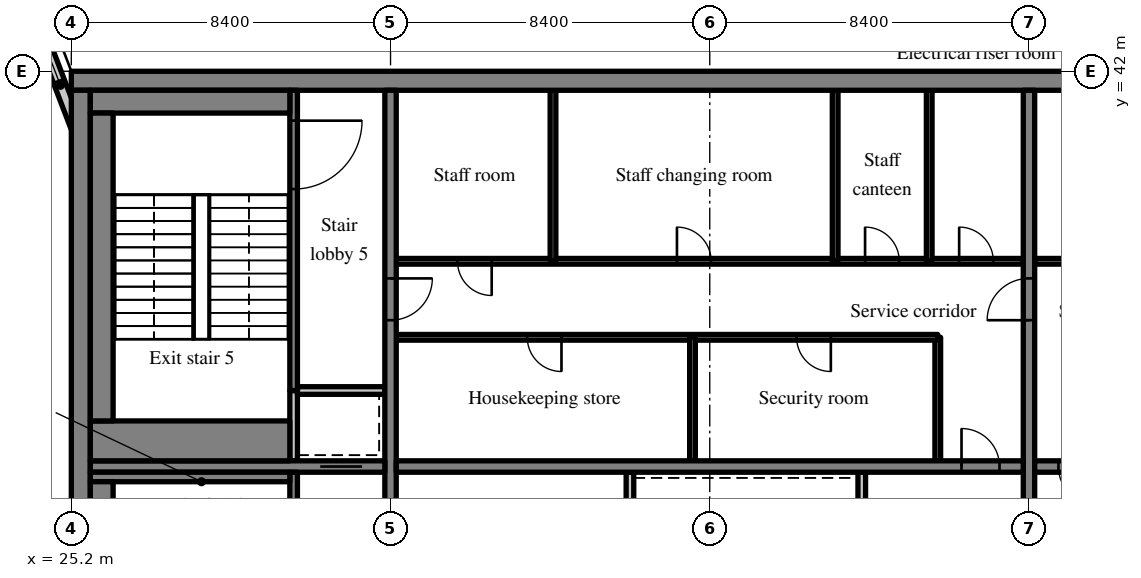
"""IFC4 building model, lengths in metres.
Left out: names, types, materials, properties, quantities, classifications, styles, units other than length and angle.
Written with IfcOpenShell. Run it as: python <this file> out.ifc"""

import sys

from ifc_helpers import new_model, si_unit, direction, frame, frame_2d, origin, place, context, subcontext, project, spatial, rectangle, extrude, source, transform, mapped, element, fill, save


model = new_model("IFC4")
c1 = context("Model", 3, precision=1e-05, world=origin(), true_north=direction((0.0, 1.0)))
c2 = subcontext(c1, "Body", "Model", "MODEL_VIEW")
j1 = project(units=[si_unit("LENGTHUNIT", "METRE"), si_unit("PLANEANGLEUNIT", "RADIAN")], contexts=[c1])
p1 = place(None, origin())
s1 = spatial("IfcSite", under=j1, at=p1, CompositionType="ELEMENT")
p2 = place(p1, origin())
s2 = spatial("IfcBuilding", under=s1, at=p2, CompositionType="ELEMENT")
p3 = place(p2, frame((0.0, 0.0, 309.7)))
s3 = spatial("IfcBuildingStorey", under=s2, at=p3, CompositionType="ELEMENT", Elevation=309.7)
m1 = source(origin(), c2, "Body", "SweptSolid", [
    extrude(rectangle(XDim=50.4, YDim=0.5, at=frame_2d((25.2, 0.0))), origin(), (0.0, 0.0, 1.0), 3.72),
])
p4 = place(p3, frame((25.2, 41.75, 0.0), z_axis=(0.0, 0.0, 1.0), x_axis=(1.0, 0.0, 0.0)))
e1 = element("IfcWall", 1, at=p4, inside=s3, PredefinedType="SHEAR", context=c2, shape_type="MappedRepresentation", body=[
    mapped(m1, transform((0.0, 0.0, 0.0), scale=1.0)),
])
m2 = source(origin(), c2, "Body", "SweptSolid", [
    extrude(rectangle(XDim=19.0, YDim=0.5, at=frame_2d((9.5, 0.0))), origin(), (0.0, 0.0, 1.0), 3.72),
])
p5 = place(p3, frame((25.45, 22.5, 0.0), z_axis=(0.0, 0.0, 1.0), x_axis=(0.0, 1.0, 0.0)))
e2 = element("IfcWall", 2, at=p5, inside=s3, PredefinedType="SHEAR", context=c2, shape_type="MappedRepresentation", body=[
    mapped(m2, transform((0.0, 0.0, 0.0), scale=1.0)),
])
m3 = source(origin(), c2, "Body", "SweptSolid", [
    extrude(rectangle(XDim=19.0, YDim=0.3, at=frame_2d((9.5, 0.0))), origin(), (0.0, 0.0, 1.0), 3.72),
])
p6 = place(p3, frame((33.6, 22.5, 0.0), z_axis=(0.0, 0.0, 1.0), x_axis=(0.0, 1.0, 0.0)))
e3 = element("IfcWall", 3, at=p6, inside=s3, PredefinedType="SHEAR", context=c2, shape_type="MappedRepresentation", body=[
    mapped(m3, transform((0.0, 0.0, 0.0), scale=1.0)),
])
m4 = source(origin(), c2, "Body", "SweptSolid", [
    extrude(rectangle(XDim=1.1, YDim=2.1, at=frame_2d((0.55, 1.05))), frame((0.0, 0.16, 0.0), z_axis=(0.0, -1.0, 0.0), x_axis=(1.0, 0.0, 0.0)), (0.0, 0.0, 1.0), 0.32),
])
p7 = place(p6, frame((12.95, 0.0, 0.0)))
e4 = element("IfcOpeningElement", 4, at=p7, cuts=e3, PredefinedType="OPENING", context=c2, shape_type="MappedRepresentation", body=[
    mapped(m4, transform((0.0, 0.0, 0.0), scale=1.0)),
])
p8 = place(p3, frame((50.4, 22.5, 0.0), z_axis=(0.0, 0.0, 1.0), x_axis=(0.0, 1.0, 0.0)))
e5 = element("IfcWall", 5, at=p8, inside=s3, PredefinedType="SHEAR", context=c2, shape_type="MappedRepresentation", body=[
    mapped(m3, transform((0.0, 0.0, 0.0), scale=1.0)),
])
p9 = place(p8, frame((12.95, 0.0, 0.0)))
e6 = element("IfcOpeningElement", 6, at=p9, cuts=e5, PredefinedType="OPENING", context=c2, shape_type="MappedRepresentation", body=[
    mapped(m4, transform((0.0, 0.0, 0.0), scale=1.0)),
])
m5 = source(origin(), c2, "Body", "SweptSolid", [
    extrude(rectangle(XDim=7.75, YDim=0.3, at=frame_2d((3.875, 0.0))), origin(), (0.0, 0.0, 1.0), 3.72),
])
p10 = place(p3, frame((25.7, 31.6, 0.0), z_axis=(0.0, 0.0, 1.0), x_axis=(1.0, 0.0, 0.0)))
e7 = element("IfcWall", 7, at=p10, inside=s3, PredefinedType="SHEAR", context=c2, shape_type="MappedRepresentation", body=[
    mapped(m5, transform((0.0, 0.0, 0.0), scale=1.0)),
])
p11 = place(p10, frame((6.05, 0.0, 0.0)))
e8 = element("IfcOpeningElement", 8, at=p11, cuts=e7, PredefinedType="OPENING", context=c2, shape_type="MappedRepresentation", body=[
    mapped(m4, transform((0.0, 0.0, 0.0), scale=1.0)),
])
m6 = source(origin(), c2, "Body", "SweptSolid", [
    extrude(rectangle(XDim=16.5, YDim=0.3, at=frame_2d((8.25, 0.0))), origin(), (0.0, 0.0, 1.0), 3.72),
])
p12 = place(p3, frame((33.75, 31.6, 0.0), z_axis=(0.0, 0.0, 1.0), x_axis=(1.0, 0.0, 0.0)))
e9 = element("IfcWall", 9, at=p12, inside=s3, PredefinedType="SHEAR", context=c2, shape_type="MappedRepresentation", body=[
    mapped(m6, transform((0.0, 0.0, 0.0), scale=1.0)),
])
m7 = source(origin(), c2, "Body", "SweptSolid", [
    extrude(rectangle(XDim=1.0, YDim=2.1, at=frame_2d((0.5, 1.05))), frame((0.0, 0.16, 0.0), z_axis=(0.0, -1.0, 0.0), x_axis=(1.0, 0.0, 0.0)), (0.0, 0.0, 1.0), 0.32),
])
p13 = place(p12, frame((14.875, 0.0, 0.0)))
e10 = element("IfcOpeningElement", 10, at=p13, cuts=e9, PredefinedType="OPENING", context=c2, shape_type="MappedRepresentation", body=[
    mapped(m7, transform((0.0, 0.0, 0.0), scale=1.0)),
])
p14 = place(p3, frame((50.55, 31.6, 0.0), z_axis=(0.0, 0.0, 1.0), x_axis=(1.0, 0.0, 0.0)))
e11 = element("IfcWall", 11, at=p14, inside=s3, PredefinedType="SHEAR", context=c2, shape_type="MappedRepresentation", body=[
    mapped(m6, transform((0.0, 0.0, 0.0), scale=1.0)),
])
p15 = place(p14, frame((0.625, 0.0, 0.0)))
e12 = element("IfcOpeningElement", 12, at=p15, cuts=e11, PredefinedType="OPENING", context=c2, shape_type="MappedRepresentation", body=[
    mapped(m7, transform((0.0, 0.0, 0.0), scale=1.0)),
])
m8 = source(origin(), c2, "Body", "SweptSolid", [
    extrude(rectangle(XDim=3.559, YDim=0.3, at=frame_2d((1.78, 0.0))), origin(), (0.0, 0.0, 1.0), 3.72),
])
p16 = place(p3, frame((25.55, 39.969, 0.0), z_axis=(0.0, 0.0, 1.0), x_axis=(-0.35779745313, 0.933799219604, 0.0)))
e13 = element("IfcWall", 13, at=p16, inside=s3, PredefinedType="SOLIDWALL", context=c2, shape_type="MappedRepresentation", body=[
    mapped(m8, transform((0.0, 0.0, 0.0), scale=1.0)),
])
m9 = source(origin(), c2, "Body", "SweptSolid", [
    extrude(rectangle(XDim=1.5, YDim=2.0, at=frame_2d((0.75, 1.0))), frame((0.0, 0.16, 0.0), z_axis=(0.0, -1.0, 0.0), x_axis=(1.0, 0.0, 0.0)), (0.0, 0.0, 1.0), 0.32),
])
p17 = place(p16, frame((1.903, 0.0, 0.9)))
e14 = element("IfcOpeningElement", 14, at=p17, cuts=e13, PredefinedType="OPENING", context=c2, shape_type="MappedRepresentation", body=[
    mapped(m9, transform((0.0, 0.0, 0.0), scale=1.0)),
])
m10 = source(origin(), c2, "Body", "SweptSolid", [
    extrude(rectangle(XDim=8.95, YDim=0.2, at=frame_2d((4.475, 0.0))), origin(), (0.0, 0.0, 1.0), 3.72),
])
p18 = place(p3, frame((39.9, 22.5, 0.0), z_axis=(0.0, 0.0, 1.0), x_axis=(0.0, 1.0, 0.0)))
e15 = element("IfcWall", 15, at=p18, inside=s3, PredefinedType="PARTITIONING", context=c2, shape_type="MappedRepresentation", body=[
    mapped(m10, transform((0.0, 0.0, 0.0), scale=1.0)),
])
m11 = source(origin(), c2, "Body", "SweptSolid", [
    extrude(rectangle(XDim=0.9, YDim=2.1, at=frame_2d((0.45, 1.05))), frame((0.0, 0.11, 0.0), z_axis=(0.0, -1.0, 0.0), x_axis=(1.0, 0.0, 0.0)), (0.0, 0.0, 1.0), 0.22),
])
p19 = place(p18, frame((5.05, 0.0, 0.0)))
e16 = element("IfcOpeningElement", 16, at=p19, cuts=e15, PredefinedType="OPENING", context=c2, shape_type="MappedRepresentation", body=[
    mapped(m11, transform((0.0, 0.0, 0.0), scale=1.0)),
])
m12 = source(origin(), c2, "Body", "SweptSolid", [
    extrude(rectangle(XDim=2.65, YDim=0.2, at=frame_2d((1.325, 0.0))), origin(), (0.0, 0.0, 1.0), 3.72),
])
p20 = place(p3, frame((46.0, 28.8, 0.0), z_axis=(0.0, 0.0, 1.0), x_axis=(0.0, 1.0, 0.0)))
e17 = element("IfcWall", 17, at=p20, inside=s3, PredefinedType="SOLIDWALL", context=c2, shape_type="MappedRepresentation", body=[
    mapped(m12, transform((0.0, 0.0, 0.0), scale=1.0)),
])
m13 = source(origin(), c2, "Body", "SweptSolid", [
    extrude(rectangle(XDim=3.25, YDim=0.15, at=frame_2d((1.625, 0.0))), origin(), (0.0, 0.0, 1.0), 3.72),
])
p21 = place(p3, frame((48.0, 31.75, 0.0), z_axis=(0.0, 0.0, 1.0), x_axis=(0.0, 1.0, 0.0)))
e18 = element("IfcWall", 18, at=p21, inside=s3, PredefinedType="PARTITIONING", context=c2, shape_type="MappedRepresentation", body=[
    mapped(m13, transform((0.0, 0.0, 0.0), scale=1.0)),
])
m14 = source(origin(), c2, "Body", "SweptSolid", [
    extrude(rectangle(XDim=14.25, YDim=0.15, at=frame_2d((7.125, 0.0))), origin(), (0.0, 0.0, 1.0), 3.72),
])
p22 = place(p3, frame((33.75, 35.0, 0.0), z_axis=(0.0, 0.0, 1.0), x_axis=(1.0, 0.0, 0.0)))
e19 = element("IfcWall", 19, at=p22, inside=s3, PredefinedType="PARTITIONING", context=c2, shape_type="MappedRepresentation", body=[
    mapped(m14, transform((0.0, 0.0, 0.0), scale=1.0)),
])
m15 = source(origin(), c2, "Body", "SweptSolid", [
    extrude(rectangle(XDim=0.9, YDim=2.1, at=frame_2d((0.45, 1.05))), frame((0.0, 0.085, 0.0), z_axis=(0.0, -1.0, 0.0), x_axis=(1.0, 0.0, 0.0)), (0.0, 0.0, 1.0), 0.17),
])
p23 = place(p22, frame((3.448, 0.0, 0.0)))
e20 = element("IfcOpeningElement", 20, at=p23, cuts=e19, PredefinedType="OPENING", context=c2, shape_type="MappedRepresentation", body=[
    mapped(m15, transform((0.0, 0.0, 0.0), scale=1.0)),
])
p24 = place(p22, frame((10.536, 0.0, 0.0)))
e21 = element("IfcOpeningElement", 21, at=p24, cuts=e19, PredefinedType="OPENING", context=c2, shape_type="MappedRepresentation", body=[
    mapped(m15, transform((0.0, 0.0, 0.0), scale=1.0)),
])
m16 = source(origin(), c2, "Body", "SweptSolid", [
    extrude(rectangle(XDim=16.5, YDim=0.15, at=frame_2d((8.25, 0.0))), origin(), (0.0, 0.0, 1.0), 3.72),
])
p25 = place(p3, frame((33.75, 37.0, 0.0), z_axis=(0.0, 0.0, 1.0), x_axis=(1.0, 0.0, 0.0)))
e22 = element("IfcWall", 22, at=p25, inside=s3, PredefinedType="PARTITIONING", context=c2, shape_type="MappedRepresentation", body=[
    mapped(m16, transform((0.0, 0.0, 0.0), scale=1.0)),
])
p26 = place(p25, frame((1.612, 0.0, 0.0)))
e23 = element("IfcOpeningElement", 23, at=p26, cuts=e22, PredefinedType="OPENING", context=c2, shape_type="MappedRepresentation", body=[
    mapped(m15, transform((0.0, 0.0, 0.0), scale=1.0)),
])
p27 = place(p25, frame((7.387, 0.0, 0.0)))
e24 = element("IfcOpeningElement", 24, at=p27, cuts=e22, PredefinedType="OPENING", context=c2, shape_type="MappedRepresentation", body=[
    mapped(m15, transform((0.0, 0.0, 0.0), scale=1.0)),
])
p28 = place(p25, frame((12.337, 0.0, 0.0)))
e25 = element("IfcOpeningElement", 25, at=p28, cuts=e22, PredefinedType="OPENING", context=c2, shape_type="MappedRepresentation", body=[
    mapped(m15, transform((0.0, 0.0, 0.0), scale=1.0)),
])
p29 = place(p25, frame((14.813, 0.0, 0.0)))
e26 = element("IfcOpeningElement", 26, at=p29, cuts=e22, PredefinedType="OPENING", context=c2, shape_type="MappedRepresentation", body=[
    mapped(m15, transform((0.0, 0.0, 0.0), scale=1.0)),
])
p30 = place(p3, frame((41.546, 31.75, 0.0), z_axis=(0.0, 0.0, 1.0), x_axis=(0.0, 1.0, 0.0)))
e27 = element("IfcWall", 27, at=p30, inside=s3, PredefinedType="PARTITIONING", context=c2, shape_type="MappedRepresentation", body=[
    mapped(m13, transform((0.0, 0.0, 0.0), scale=1.0)),
])
m17 = source(origin(), c2, "Body", "SweptSolid", [
    extrude(rectangle(XDim=4.5, YDim=0.15, at=frame_2d((2.25, 0.0))), origin(), (0.0, 0.0, 1.0), 3.72),
])
for number, where, z_axis, x_axis in (
    (28, (37.875, 37.0, 0.0), (0.0, 0.0, 1.0), (0.0, 1.0, 0.0)),
    (29, (45.3, 37.0, 0.0), (0.0, 0.0, 1.0), (0.0, 1.0, 0.0)),
    (30, (47.775, 37.0, 0.0), (0.0, 0.0, 1.0), (0.0, 1.0, 0.0)),
):
    element("IfcWall", number, at=place(p3, frame(where, z_axis=z_axis, x_axis=x_axis)), inside=s3, PredefinedType="PARTITIONING", context=c2, shape_type="MappedRepresentation", body=[
        mapped(m17, transform((0.0, 0.0, 0.0), scale=1.0)),
    ])
p31 = place(p3, frame((67.05, 37.0, 0.0), z_axis=(0.0, 0.0, 1.0), x_axis=(-1.0, 0.0, 0.0)))
e31 = element("IfcWall", 31, at=p31, inside=s3, PredefinedType="PARTITIONING", context=c2, shape_type="MappedRepresentation", body=[
    mapped(m16, transform((0.0, 0.0, 0.0), scale=1.0)),
])
p32 = place(p31, frame((3.263, 0.0, 0.0)))
e32 = element("IfcOpeningElement", 32, at=p32, cuts=e31, PredefinedType="OPENING", context=c2, shape_type="MappedRepresentation", body=[
    mapped(m15, transform((0.0, 0.0, 0.0), scale=1.0)),
])
p33 = place(p31, frame((8.212, 0.0, 0.0)))
e33 = element("IfcOpeningElement", 33, at=p33, cuts=e31, PredefinedType="OPENING", context=c2, shape_type="MappedRepresentation", body=[
    mapped(m15, transform((0.0, 0.0, 0.0), scale=1.0)),
])
p34 = place(p31, frame((11.513, 0.0, 0.0)))
e34 = element("IfcOpeningElement", 34, at=p34, cuts=e31, PredefinedType="OPENING", context=c2, shape_type="MappedRepresentation", body=[
    mapped(m15, transform((0.0, 0.0, 0.0), scale=1.0)),
])
p35 = place(p31, frame((14.813, 0.0, 0.0)))
e35 = element("IfcOpeningElement", 35, at=p35, cuts=e31, PredefinedType="OPENING", context=c2, shape_type="MappedRepresentation", body=[
    mapped(m15, transform((0.0, 0.0, 0.0), scale=1.0)),
])
m18 = source(origin(), c2, "Body", "SweptSolid", [
    extrude(rectangle(XDim=8.95, YDim=0.2, at=frame_2d((4.475, 0.0))), origin(), (0.0, 0.0, 1.0), 3.72),
])
p36 = place(p3, frame((31.05, 22.5, 0.0), z_axis=(0.0, 0.0, 1.0), x_axis=(0.0, 1.0, 0.0)))
e36 = element("IfcWall", 36, at=p36, inside=s3, PredefinedType="SOLIDWALL", context=c2, shape_type="MappedRepresentation", body=[
    mapped(m18, transform((0.0, 0.0, 0.0), scale=1.0)),
])
m19 = source(origin(), c2, "Body", "SweptSolid", [
    extrude(rectangle(XDim=1.2, YDim=2.1, at=frame_2d((0.6, 1.05))), frame((0.0, 0.11, 0.0), z_axis=(0.0, -1.0, 0.0), x_axis=(1.0, 0.0, 0.0)), (0.0, 0.0, 1.0), 0.22),
])
p37 = place(p36, frame((7.0, 0.0, 0.0)))
e37 = element("IfcOpeningElement", 37, at=p37, cuts=e36, PredefinedType="OPENING", context=c2, shape_type="MappedRepresentation", body=[
    mapped(m19, transform((0.0, 0.0, 0.0), scale=1.0)),
])
m20 = source(origin(), c2, "Body", "SweptSolid", [
    extrude(rectangle(XDim=1.85, YDim=0.2, at=frame_2d((0.925, 0.0))), origin(), (0.0, 0.0, 1.0), 3.72),
])
p38 = place(p3, frame((31.05, 31.75, 0.0), z_axis=(0.0, 0.0, 1.0), x_axis=(0.0, 1.0, 0.0)))
e38 = element("IfcWall", 38, at=p38, inside=s3, PredefinedType="SOLIDWALL", context=c2, shape_type="MappedRepresentation", body=[
    mapped(m20, transform((0.0, 0.0, 0.0), scale=1.0)),
])
m21 = source(origin(), c2, "Body", "SweptSolid", [
    extrude(rectangle(XDim=2.3, YDim=0.2, at=frame_2d((1.15, 0.0))), origin(), (0.0, 0.0, 1.0), 3.72),
])
p39 = place(p3, frame((31.15, 33.6, 0.0), z_axis=(0.0, 0.0, 1.0), x_axis=(1.0, 0.0, 0.0)))
e39 = element("IfcWall", 39, at=p39, inside=s3, PredefinedType="SOLIDWALL", context=c2, shape_type="MappedRepresentation", body=[
    mapped(m21, transform((0.0, 0.0, 0.0), scale=1.0)),
])
m22 = source(origin(), c2, "Body", "SweptSolid", [
    extrude(rectangle(XDim=7.9, YDim=0.2, at=frame_2d((3.95, 0.0))), origin(), (0.0, 0.0, 1.0), 3.72),
])
p40 = place(p3, frame((31.05, 33.6, 0.0), z_axis=(0.0, 0.0, 1.0), x_axis=(0.0, 1.0, 0.0)))
e40 = element("IfcWall", 40, at=p40, inside=s3, PredefinedType="SOLIDWALL", context=c2, shape_type="MappedRepresentation", body=[
    mapped(m22, transform((0.0, 0.0, 0.0), scale=1.0)),
])
m23 = source(origin(), c2, "Body", "SweptSolid", [
    extrude(rectangle(XDim=1.8, YDim=2.1, at=frame_2d((0.9, 1.05))), frame((0.0, 0.11, 0.0), z_axis=(0.0, -1.0, 0.0), x_axis=(1.0, 0.0, 0.0)), (0.0, 0.0, 1.0), 0.22),
])
p41 = place(p40, frame((5.3, 0.0, 0.0)))
e41 = element("IfcOpeningElement", 41, at=p41, cuts=e40, PredefinedType="OPENING", context=c2, shape_type="MappedRepresentation", body=[
    mapped(m23, transform((0.0, 0.0, 0.0), scale=1.0)),
])
m24 = source(origin(), c2, "Body", "SweptSolid", [
    extrude(rectangle(XDim=5.25, YDim=0.25, at=frame_2d((2.625, 0.0))), origin(), (0.0, 0.0, 1.0), 3.72),
])
p42 = place(p3, frame((25.7, 31.325, 0.0), z_axis=(0.0, 0.0, 1.0), x_axis=(1.0, 0.0, 0.0)))
e42 = element("IfcWall", 42, at=p42, inside=s3, PredefinedType="SOLIDWALL", context=c2, shape_type="MappedRepresentation", body=[
    mapped(m24, transform((0.0, 0.0, 0.0), scale=1.0)),
])
m25 = source(origin(), c2, "Body", "SweptSolid", [
    extrude(rectangle(XDim=8.1, YDim=0.6, at=frame_2d((4.05, 0.0))), origin(), (0.0, 0.0, 1.0), 3.72),
])
p43 = place(p3, frame((26.0, 23.1, 0.0), z_axis=(0.0, 0.0, 1.0), x_axis=(0.0, 1.0, 0.0)))
e43 = element("IfcWall", 43, at=p43, inside=s3, PredefinedType="SOLIDWALL", context=c2, shape_type="MappedRepresentation", body=[
    mapped(m25, transform((0.0, 0.0, 0.0), scale=1.0)),
])
m26 = source(origin(), c2, "Body", "SweptSolid", [
    extrude(rectangle(XDim=5.25, YDim=0.6, at=frame_2d((2.625, 0.0))), origin(), (0.0, 0.0, 1.0), 3.72),
])
p44 = place(p3, frame((25.7, 41.2, 0.0), z_axis=(0.0, 0.0, 1.0), x_axis=(1.0, 0.0, 0.0)))
e44 = element("IfcWall", 44, at=p44, inside=s3, PredefinedType="SOLIDWALL", context=c2, shape_type="MappedRepresentation", body=[
    mapped(m26, transform((0.0, 0.0, 0.0), scale=1.0)),
])
m27 = source(origin(), c2, "Body", "SweptSolid", [
    extrude(rectangle(XDim=5.25, YDim=1.05, at=frame_2d((2.625, 0.0))), origin(), (0.0, 0.0, 1.0), 3.72),
])
p45 = place(p3, frame((25.7, 32.275, 0.0), z_axis=(0.0, 0.0, 1.0), x_axis=(1.0, 0.0, 0.0)))
e45 = element("IfcWall", 45, at=p45, inside=s3, PredefinedType="SOLIDWALL", context=c2, shape_type="MappedRepresentation", body=[
    mapped(m27, transform((0.0, 0.0, 0.0), scale=1.0)),
])
p46 = place(p3, frame((26.0, 32.8, 0.0), z_axis=(0.0, 0.0, 1.0), x_axis=(0.0, 1.0, 0.0)))
e46 = element("IfcWall", 46, at=p46, inside=s3, PredefinedType="SOLIDWALL", context=c2, shape_type="MappedRepresentation", body=[
    mapped(m25, transform((0.0, 0.0, 0.0), scale=1.0)),
])
m28 = source(origin(), c2, "Body", "SweptSolid", [
    extrude(rectangle(XDim=1.5, YDim=2.0, at=frame_2d((0.75, 1.0))), frame((0.0, 0.03, 0.0), z_axis=(0.0, -1.0, 0.0), x_axis=(1.0, 0.0, 0.0)), (0.0, 0.0, 1.0), 0.06),
])
p47 = place(p17, origin())
e47 = element("IfcWindow", 47, at=p47, inside=s3, PartitioningType="SINGLE_PANEL", PredefinedType="WINDOW", context=c2, shape_type="MappedRepresentation", body=[
    mapped(m28, transform((0.0, 0.0, 0.0), scale=1.0)),
])
fill(e14, e47)
m29 = source(origin(), c2, "Body", "SweptSolid", [
    extrude(rectangle(XDim=1.0, YDim=2.1, at=frame_2d((0.5, 1.05))), frame((0.0, 0.025, 0.0), z_axis=(0.0, -1.0, 0.0), x_axis=(1.0, 0.0, 0.0)), (0.0, 0.0, 1.0), 0.05),
])
p48 = place(p13, origin())
e48 = element("IfcDoor", 48, at=p48, inside=s3, OperationType="SINGLE_SWING_LEFT", PredefinedType="DOOR", context=c2, shape_type="MappedRepresentation", body=[
    mapped(m29, transform((0.0, 0.0, 0.0), scale=1.0)),
])
fill(e10, e48)
m30 = source(origin(), c2, "Body", "SweptSolid", [
    extrude(rectangle(XDim=0.9, YDim=2.1, at=frame_2d((0.45, 1.05))), frame((0.0, 0.025, 0.0), z_axis=(0.0, -1.0, 0.0), x_axis=(1.0, 0.0, 0.0)), (0.0, 0.0, 1.0), 0.05),
])
p49 = place(p23, origin())
e49 = element("IfcDoor", 49, at=p49, inside=s3, OperationType="SINGLE_SWING_RIGHT", PredefinedType="DOOR", context=c2, shape_type="MappedRepresentation", body=[
    mapped(m30, transform((0.0, 0.0, 0.0), scale=1.0)),
])
fill(e20, e49)
p50 = place(p24, origin())
e50 = element("IfcDoor", 50, at=p50, inside=s3, OperationType="SINGLE_SWING_RIGHT", PredefinedType="DOOR", context=c2, shape_type="MappedRepresentation", body=[
    mapped(m30, transform((0.0, 0.0, 0.0), scale=1.0)),
])
fill(e21, e50)
p51 = place(p26, origin())
e51 = element("IfcDoor", 51, at=p51, inside=s3, OperationType="SINGLE_SWING_RIGHT", PredefinedType="DOOR", context=c2, shape_type="MappedRepresentation", body=[
    mapped(m30, transform((0.0, 0.0, 0.0), scale=1.0)),
])
fill(e23, e51)
p52 = place(p27, origin())
e52 = element("IfcDoor", 52, at=p52, inside=s3, OperationType="SINGLE_SWING_LEFT", PredefinedType="DOOR", context=c2, shape_type="MappedRepresentation", body=[
    mapped(m30, transform((0.0, 0.0, 0.0), scale=1.0)),
])
fill(e24, e52)
p53 = place(p28, origin())
e53 = element("IfcDoor", 53, at=p53, inside=s3, OperationType="SINGLE_SWING_LEFT", PredefinedType="DOOR", context=c2, shape_type="MappedRepresentation", body=[
    mapped(m30, transform((0.0, 0.0, 0.0), scale=1.0)),
])
fill(e25, e53)
p54 = place(p29, origin())
e54 = element("IfcDoor", 54, at=p54, inside=s3, OperationType="SINGLE_SWING_LEFT", PredefinedType="DOOR", context=c2, shape_type="MappedRepresentation", body=[
    mapped(m30, transform((0.0, 0.0, 0.0), scale=1.0)),
])
fill(e26, e54)
p55 = place(p15, origin())
e55 = element("IfcDoor", 55, at=p55, inside=s3, OperationType="SINGLE_SWING_RIGHT", PredefinedType="DOOR", context=c2, shape_type="MappedRepresentation", body=[
    mapped(m29, transform((0.0, 0.0, 0.0), scale=1.0)),
])
fill(e12, e55)
m31 = source(origin(), c2, "Body", "SweptSolid", [
    extrude(rectangle(XDim=1.1, YDim=2.1, at=frame_2d((0.55, 1.05))), frame((0.0, 0.025, 0.0), z_axis=(0.0, -1.0, 0.0), x_axis=(1.0, 0.0, 0.0)), (0.0, 0.0, 1.0), 0.05),
])
p56 = place(p11, origin())
e56 = element("IfcDoor", 56, at=p56, inside=s3, OperationType="SLIDING_TO_LEFT", PredefinedType="DOOR", context=c2, shape_type="MappedRepresentation", body=[
    mapped(m31, transform((0.0, 0.0, 0.0), scale=1.0)),
])
fill(e8, e56)
m32 = source(origin(), c2, "Body", "SweptSolid", [
    extrude(rectangle(XDim=1.8, YDim=2.1, at=frame_2d((0.9, 1.05))), frame((0.0, 0.025, 0.0), z_axis=(0.0, -1.0, 0.0), x_axis=(1.0, 0.0, 0.0)), (0.0, 0.0, 1.0), 0.05),
])
p57 = place(p41, origin())
e57 = element("IfcDoor", 57, at=p57, inside=s3, OperationType="SINGLE_SWING_RIGHT", PredefinedType="DOOR", context=c2, shape_type="MappedRepresentation", body=[
    mapped(m32, transform((0.0, 0.0, 0.0), scale=1.0)),
])
fill(e41, e57)
p58 = place(p7, origin())
e58 = element("IfcDoor", 58, at=p58, inside=s3, OperationType="SINGLE_SWING_RIGHT", PredefinedType="DOOR", context=c2, shape_type="MappedRepresentation", body=[
    mapped(m31, transform((0.0, 0.0, 0.0), scale=1.0)),
])
fill(e4, e58)
p59 = place(p9, origin())
e59 = element("IfcDoor", 59, at=p59, inside=s3, OperationType="SINGLE_SWING_LEFT", PredefinedType="DOOR", context=c2, shape_type="MappedRepresentation", body=[
    mapped(m31, transform((0.0, 0.0, 0.0), scale=1.0)),
])
fill(e6, e59)
save(model, sys.argv[1])
